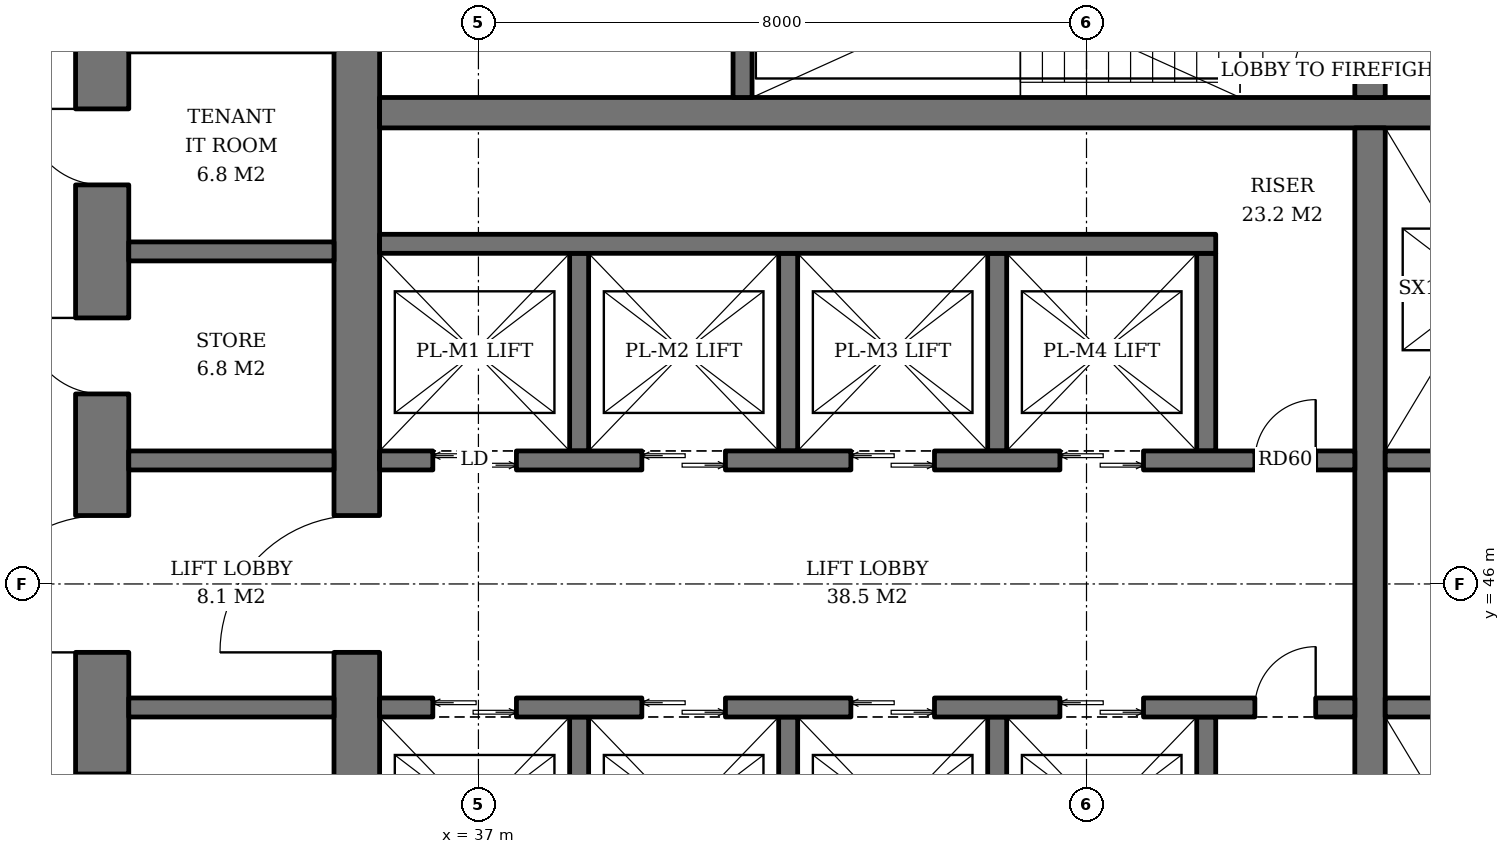
"""IFC4 building model, lengths in metres.
Left out: names, types, materials, properties, quantities, classifications, styles, units other than length and angle.
Written with IfcOpenShell. Run it as: python <this file> out.ifc"""

import sys

from ifc_helpers import new_model, si_unit, direction, frame, frame_2d, origin, place, context, subcontext, project, spatial, rectangle, extrude, element, fill, save


model = new_model("IFC4")
c1 = context("Model", 3, precision=1e-05, world=origin(), true_north=direction((0.0, 1.0)))
c2 = subcontext(c1, "Body", "Model", "MODEL_VIEW")
j1 = project(units=[si_unit("LENGTHUNIT", "METRE"), si_unit("PLANEANGLEUNIT", "RADIAN")], contexts=[c1])
p1 = place(None, origin())
s1 = spatial("IfcSite", under=j1, at=p1, CompositionType="ELEMENT")
p2 = place(p1, origin())
s2 = spatial("IfcBuilding", under=s1, at=p2, CompositionType="ELEMENT")
p3 = place(p2, frame((0.0, 0.0, 112.2)))
s3 = spatial("IfcBuildingStorey", under=s2, at=p3, CompositionType="ELEMENT", Elevation=112.2)
p4 = place(p3, frame((35.4, 36.7, 0.0), z_axis=(0.0, 0.0, 1.0), x_axis=(0.0, 1.0, 0.0)))
e1 = element("IfcWall", 1, at=p4, inside=s3, PredefinedType="SHEAR", context=c2, shape_type="SweptSolid", body=[
    extrude(rectangle(XDim=18.6, YDim=0.6, at=frame_2d((9.3, 0.0))), origin(), (0.0, 0.0, 1.0), 3.8),
])
p5 = place(p4, frame((8.4, 0.0, 0.0)))
e2 = element("IfcOpeningElement", 2, at=p5, cuts=e1, PredefinedType="OPENING", context=c2, shape_type="SweptSolid", body=[
    extrude(rectangle(XDim=1.8, YDim=2.4, at=frame_2d((0.9, 1.2))), frame((0.0, 0.31, 0.0), z_axis=(0.0, -1.0, 0.0), x_axis=(1.0, 0.0, 0.0)), (0.0, 0.0, 1.0), 0.62),
])
p6 = place(p3, frame((32.05, 33.4, 0.0), z_axis=(0.0, 0.0, 1.0), x_axis=(0.0, 1.0, 0.0)))
e3 = element("IfcWall", 3, at=p6, inside=s3, PredefinedType="SHEAR", context=c2, shape_type="SweptSolid", body=[
    extrude(rectangle(XDim=25.2, YDim=0.7, at=frame_2d((12.6, 0.0))), origin(), (0.0, 0.0, 1.0), 3.8),
])
p7 = place(p6, frame((11.7, 0.0, 0.0)))
e4 = element("IfcOpeningElement", 4, at=p7, cuts=e3, PredefinedType="OPENING", context=c2, shape_type="SweptSolid", body=[
    extrude(rectangle(XDim=1.8, YDim=2.4, at=frame_2d((0.9, 1.2))), frame((0.0, 0.36, 0.0), z_axis=(0.0, -1.0, 0.0), x_axis=(1.0, 0.0, 0.0)), (0.0, 0.0, 1.0), 0.72),
])
p8 = place(p6, frame((3.6, 0.0, 0.0)))
e5 = element("IfcOpeningElement", 5, at=p8, cuts=e3, PredefinedType="OPENING", context=c2, shape_type="SweptSolid", body=[
    extrude(rectangle(XDim=1.0, YDim=2.1, at=frame_2d((0.5, 1.05))), frame((0.0, 0.36, 0.0), z_axis=(0.0, -1.0, 0.0), x_axis=(1.0, 0.0, 0.0)), (0.0, 0.0, 1.0), 0.72),
])
p9 = place(p6, frame((6.35, 0.0, 0.0)))
e6 = element("IfcOpeningElement", 6, at=p9, cuts=e3, PredefinedType="OPENING", context=c2, shape_type="SweptSolid", body=[
    extrude(rectangle(XDim=1.0, YDim=2.1, at=frame_2d((0.5, 1.05))), frame((0.0, 0.36, 0.0), z_axis=(0.0, -1.0, 0.0), x_axis=(1.0, 0.0, 0.0)), (0.0, 0.0, 1.0), 0.72),
])
p10 = place(p6, frame((9.1, 0.0, 0.0)))
e7 = element("IfcOpeningElement", 7, at=p10, cuts=e3, PredefinedType="OPENING", context=c2, shape_type="SweptSolid", body=[
    extrude(rectangle(XDim=1.0, YDim=2.1, at=frame_2d((0.5, 1.05))), frame((0.0, 0.36, 0.0), z_axis=(0.0, -1.0, 0.0), x_axis=(1.0, 0.0, 0.0)), (0.0, 0.0, 1.0), 0.72),
])
p11 = place(p6, frame((15.1, 0.0, 0.0)))
e8 = element("IfcOpeningElement", 8, at=p11, cuts=e3, PredefinedType="OPENING", context=c2, shape_type="SweptSolid", body=[
    extrude(rectangle(XDim=1.0, YDim=2.1, at=frame_2d((0.5, 1.05))), frame((0.0, 0.36, 0.0), z_axis=(0.0, -1.0, 0.0), x_axis=(1.0, 0.0, 0.0)), (0.0, 0.0, 1.0), 0.72),
])
p12 = place(p6, frame((17.85, 0.0, 0.0)))
e9 = element("IfcOpeningElement", 9, at=p12, cuts=e3, PredefinedType="OPENING", context=c2, shape_type="SweptSolid", body=[
    extrude(rectangle(XDim=1.0, YDim=2.1, at=frame_2d((0.5, 1.05))), frame((0.0, 0.36, 0.0), z_axis=(0.0, -1.0, 0.0), x_axis=(1.0, 0.0, 0.0)), (0.0, 0.0, 1.0), 0.72),
])
p13 = place(p3, frame((35.7, 52.2, 0.0), z_axis=(0.0, 0.0, 1.0), x_axis=(1.0, 0.0, 0.0)))
e10 = element("IfcWall", 10, at=p13, inside=s3, PredefinedType="SHEAR", context=c2, shape_type="SweptSolid", body=[
    extrude(rectangle(XDim=18.6, YDim=0.4, at=frame_2d((9.3, 0.0))), origin(), (0.0, 0.0, 1.0), 3.8),
])
p14 = place(p3, frame((48.73, 40.0, 0.0), z_axis=(0.0, 0.0, 1.0), x_axis=(0.0, 1.0, 0.0)))
e11 = element("IfcWall", 11, at=p14, inside=s3, PredefinedType="SHEAR", context=c2, shape_type="SweptSolid", body=[
    extrude(rectangle(XDim=12.0, YDim=0.4, at=frame_2d((6.0, 0.0))), origin(), (0.0, 0.0, 1.0), 3.8),
])
p15 = place(p3, frame((48.73, 52.4, 0.0), z_axis=(0.0, 0.0, 1.0), x_axis=(0.0, 1.0, 0.0)))
e12 = element("IfcWall", 12, at=p15, inside=s3, PredefinedType="SHEAR", context=c2, shape_type="SweptSolid", body=[
    extrude(rectangle(XDim=2.9, YDim=0.4, at=frame_2d((1.45, 0.0))), origin(), (0.0, 0.0, 1.0), 3.8),
])
p16 = place(p15, frame((0.3, 0.0, 0.0)))
e13 = element("IfcOpeningElement", 13, at=p16, cuts=e12, PredefinedType="OPENING", context=c2, shape_type="SweptSolid", body=[
    extrude(rectangle(XDim=1.0, YDim=2.1, at=frame_2d((0.5, 1.05))), frame((0.0, 0.21, 0.0), z_axis=(0.0, -1.0, 0.0), x_axis=(1.0, 0.0, 0.0)), (0.0, 0.0, 1.0), 0.42),
])
p17 = place(p3, frame((40.475, 52.4, 0.0), z_axis=(0.0, 0.0, 1.0), x_axis=(0.0, 1.0, 0.0)))
e14 = element("IfcWall", 14, at=p17, inside=s3, PredefinedType="SHEAR", context=c2, shape_type="SweptSolid", body=[
    extrude(rectangle(XDim=2.9, YDim=0.25, at=frame_2d((1.45, 0.0))), origin(), (0.0, 0.0, 1.0), 3.8),
])
for number, where, z_axis, x_axis in (
    (15, (38.325, 47.75, 0.0), (0.0, 0.0, 1.0), (0.0, 1.0, 0.0)),
    (16, (41.075, 47.75, 0.0), (0.0, 0.0, 1.0), (0.0, 1.0, 0.0)),
    (17, (43.825, 47.75, 0.0), (0.0, 0.0, 1.0), (0.0, 1.0, 0.0)),
    (18, (46.575, 47.75, 0.0), (0.0, 0.0, 1.0), (0.0, 1.0, 0.0)),
):
    element("IfcWall", number, at=place(p3, frame(where, z_axis=z_axis, x_axis=x_axis)), inside=s3, PredefinedType="SHEAR", context=c2, shape_type="SweptSolid", body=[
        extrude(rectangle(XDim=2.6, YDim=0.25, at=frame_2d((1.3, 0.0))), origin(), (0.0, 0.0, 1.0), 3.8),
    ])
p18 = place(p3, frame((35.7, 50.475, 0.0), z_axis=(0.0, 0.0, 1.0), x_axis=(1.0, 0.0, 0.0)))
e19 = element("IfcWall", 19, at=p18, inside=s3, PredefinedType="SHEAR", context=c2, shape_type="SweptSolid", body=[
    extrude(rectangle(XDim=11.0, YDim=0.25, at=frame_2d((5.5, 0.0))), origin(), (0.0, 0.0, 1.0), 3.8),
])
p19 = place(p3, frame((35.7, 47.625, 0.0), z_axis=(0.0, 0.0, 1.0), x_axis=(1.0, 0.0, 0.0)))
e20 = element("IfcWall", 20, at=p19, inside=s3, PredefinedType="SHEAR", context=c2, shape_type="SweptSolid", body=[
    extrude(rectangle(XDim=12.83, YDim=0.25, at=frame_2d((6.415, 0.0))), origin(), (0.0, 0.0, 1.0), 3.8),
])
p20 = place(p19, frame((0.7, 0.0, 0.0)))
e21 = element("IfcOpeningElement", 21, at=p20, cuts=e20, PredefinedType="OPENING", context=c2, shape_type="SweptSolid", body=[
    extrude(rectangle(XDim=1.1, YDim=2.2, at=frame_2d((0.55, 1.1))), frame((0.0, 0.135, 0.0), z_axis=(0.0, -1.0, 0.0), x_axis=(1.0, 0.0, 0.0)), (0.0, 0.0, 1.0), 0.27),
])
p21 = place(p19, frame((3.45, 0.0, 0.0)))
e22 = element("IfcOpeningElement", 22, at=p21, cuts=e20, PredefinedType="OPENING", context=c2, shape_type="SweptSolid", body=[
    extrude(rectangle(XDim=1.1, YDim=2.2, at=frame_2d((0.55, 1.1))), frame((0.0, 0.135, 0.0), z_axis=(0.0, -1.0, 0.0), x_axis=(1.0, 0.0, 0.0)), (0.0, 0.0, 1.0), 0.27),
])
p22 = place(p19, frame((6.2, 0.0, 0.0)))
e23 = element("IfcOpeningElement", 23, at=p22, cuts=e20, PredefinedType="OPENING", context=c2, shape_type="SweptSolid", body=[
    extrude(rectangle(XDim=1.1, YDim=2.2, at=frame_2d((0.55, 1.1))), frame((0.0, 0.135, 0.0), z_axis=(0.0, -1.0, 0.0), x_axis=(1.0, 0.0, 0.0)), (0.0, 0.0, 1.0), 0.27),
])
p23 = place(p19, frame((8.95, 0.0, 0.0)))
e24 = element("IfcOpeningElement", 24, at=p23, cuts=e20, PredefinedType="OPENING", context=c2, shape_type="SweptSolid", body=[
    extrude(rectangle(XDim=1.1, YDim=2.2, at=frame_2d((0.55, 1.1))), frame((0.0, 0.135, 0.0), z_axis=(0.0, -1.0, 0.0), x_axis=(1.0, 0.0, 0.0)), (0.0, 0.0, 1.0), 0.27),
])
p24 = place(p19, frame((11.515, 0.0, 0.0)))
e25 = element("IfcOpeningElement", 25, at=p24, cuts=e20, PredefinedType="OPENING", context=c2, shape_type="SweptSolid", body=[
    extrude(rectangle(XDim=0.8, YDim=2.0, at=frame_2d((0.4, 1.0))), frame((0.0, 0.135, 0.0), z_axis=(0.0, -1.0, 0.0), x_axis=(1.0, 0.0, 0.0)), (0.0, 0.0, 1.0), 0.27),
])
for number, where, z_axis, x_axis in (
    (26, (38.325, 44.25, 0.0), (0.0, 0.0, 1.0), (0.0, -1.0, 0.0)),
    (27, (41.075, 44.25, 0.0), (0.0, 0.0, 1.0), (0.0, -1.0, 0.0)),
    (28, (43.825, 44.25, 0.0), (0.0, 0.0, 1.0), (0.0, -1.0, 0.0)),
    (29, (46.575, 44.25, 0.0), (0.0, 0.0, 1.0), (0.0, -1.0, 0.0)),
):
    element("IfcWall", number, at=place(p3, frame(where, z_axis=z_axis, x_axis=x_axis)), inside=s3, PredefinedType="SHEAR", context=c2, shape_type="SweptSolid", body=[
        extrude(rectangle(XDim=2.6, YDim=0.25, at=frame_2d((1.3, 0.0))), origin(), (0.0, 0.0, 1.0), 3.8),
    ])
p25 = place(p3, frame((35.7, 44.375, 0.0), z_axis=(0.0, 0.0, 1.0), x_axis=(1.0, 0.0, 0.0)))
e30 = element("IfcWall", 30, at=p25, inside=s3, PredefinedType="SHEAR", context=c2, shape_type="SweptSolid", body=[
    extrude(rectangle(XDim=12.83, YDim=0.25, at=frame_2d((6.415, 0.0))), origin(), (0.0, 0.0, 1.0), 3.8),
])
p26 = place(p25, frame((0.7, 0.0, 0.0)))
e31 = element("IfcOpeningElement", 31, at=p26, cuts=e30, PredefinedType="OPENING", context=c2, shape_type="SweptSolid", body=[
    extrude(rectangle(XDim=1.1, YDim=2.2, at=frame_2d((0.55, 1.1))), frame((0.0, 0.135, 0.0), z_axis=(0.0, -1.0, 0.0), x_axis=(1.0, 0.0, 0.0)), (0.0, 0.0, 1.0), 0.27),
])
p27 = place(p25, frame((3.45, 0.0, 0.0)))
e32 = element("IfcOpeningElement", 32, at=p27, cuts=e30, PredefinedType="OPENING", context=c2, shape_type="SweptSolid", body=[
    extrude(rectangle(XDim=1.1, YDim=2.2, at=frame_2d((0.55, 1.1))), frame((0.0, 0.135, 0.0), z_axis=(0.0, -1.0, 0.0), x_axis=(1.0, 0.0, 0.0)), (0.0, 0.0, 1.0), 0.27),
])
p28 = place(p25, frame((6.2, 0.0, 0.0)))
e33 = element("IfcOpeningElement", 33, at=p28, cuts=e30, PredefinedType="OPENING", context=c2, shape_type="SweptSolid", body=[
    extrude(rectangle(XDim=1.1, YDim=2.2, at=frame_2d((0.55, 1.1))), frame((0.0, 0.135, 0.0), z_axis=(0.0, -1.0, 0.0), x_axis=(1.0, 0.0, 0.0)), (0.0, 0.0, 1.0), 0.27),
])
p29 = place(p25, frame((8.95, 0.0, 0.0)))
e34 = element("IfcOpeningElement", 34, at=p29, cuts=e30, PredefinedType="OPENING", context=c2, shape_type="SweptSolid", body=[
    extrude(rectangle(XDim=1.1, YDim=2.2, at=frame_2d((0.55, 1.1))), frame((0.0, 0.135, 0.0), z_axis=(0.0, -1.0, 0.0), x_axis=(1.0, 0.0, 0.0)), (0.0, 0.0, 1.0), 0.27),
])
p30 = place(p25, frame((11.515, 0.0, 0.0)))
e35 = element("IfcOpeningElement", 35, at=p30, cuts=e30, PredefinedType="OPENING", context=c2, shape_type="SweptSolid", body=[
    extrude(rectangle(XDim=0.8, YDim=2.0, at=frame_2d((0.4, 1.0))), frame((0.0, 0.135, 0.0), z_axis=(0.0, -1.0, 0.0), x_axis=(1.0, 0.0, 0.0)), (0.0, 0.0, 1.0), 0.27),
])
for number, where, z_axis, x_axis in (
    (36, (48.93, 47.625, 0.0), (0.0, 0.0, 1.0), (1.0, 0.0, 0.0)),
    (37, (48.93, 44.375, 0.0), (0.0, 0.0, 1.0), (1.0, 0.0, 0.0)),
):
    element("IfcWall", number, at=place(p3, frame(where, z_axis=z_axis, x_axis=x_axis)), inside=s3, PredefinedType="SHEAR", context=c2, shape_type="SweptSolid", body=[
        extrude(rectangle(XDim=5.37, YDim=0.25, at=frame_2d((2.685, 0.0))), origin(), (0.0, 0.0, 1.0), 3.8),
    ])
for number, where, z_axis, x_axis in (
    (38, (32.4, 44.375, 0.0), (0.0, 0.0, 1.0), (1.0, 0.0, 0.0)),
    (39, (32.4, 47.625, 0.0), (0.0, 0.0, 1.0), (1.0, 0.0, 0.0)),
    (40, (32.4, 50.375, 0.0), (0.0, 0.0, 1.0), (1.0, 0.0, 0.0)),
):
    element("IfcWall", number, at=place(p3, frame(where, z_axis=z_axis, x_axis=x_axis)), inside=s3, PredefinedType="SHEAR", context=c2, shape_type="SweptSolid", body=[
        extrude(rectangle(XDim=2.7, YDim=0.25, at=frame_2d((1.35, 0.0))), origin(), (0.0, 0.0, 1.0), 3.8),
    ])
p31 = place(p20, origin())
e41 = element("IfcDoor", 41, at=p31, inside=s3, OperationType="DOUBLE_DOOR_SLIDING", PredefinedType="DOOR", context=c2, shape_type="SweptSolid", body=[
    extrude(rectangle(XDim=1.1, YDim=2.2, at=frame_2d((0.55, 1.1))), frame((0.0, 0.025, 0.0), z_axis=(0.0, -1.0, 0.0), x_axis=(1.0, 0.0, 0.0)), (0.0, 0.0, 1.0), 0.05),
])
fill(e21, e41)
p32 = place(p21, origin())
e42 = element("IfcDoor", 42, at=p32, inside=s3, OperationType="DOUBLE_DOOR_SLIDING", PredefinedType="DOOR", context=c2, shape_type="SweptSolid", body=[
    extrude(rectangle(XDim=1.1, YDim=2.2, at=frame_2d((0.55, 1.1))), frame((0.0, 0.025, 0.0), z_axis=(0.0, -1.0, 0.0), x_axis=(1.0, 0.0, 0.0)), (0.0, 0.0, 1.0), 0.05),
])
fill(e22, e42)
p33 = place(p22, origin())
e43 = element("IfcDoor", 43, at=p33, inside=s3, OperationType="DOUBLE_DOOR_SLIDING", PredefinedType="DOOR", context=c2, shape_type="SweptSolid", body=[
    extrude(rectangle(XDim=1.1, YDim=2.2, at=frame_2d((0.55, 1.1))), frame((0.0, 0.025, 0.0), z_axis=(0.0, -1.0, 0.0), x_axis=(1.0, 0.0, 0.0)), (0.0, 0.0, 1.0), 0.05),
])
fill(e23, e43)
p34 = place(p23, origin())
e44 = element("IfcDoor", 44, at=p34, inside=s3, OperationType="DOUBLE_DOOR_SLIDING", PredefinedType="DOOR", context=c2, shape_type="SweptSolid", body=[
    extrude(rectangle(XDim=1.1, YDim=2.2, at=frame_2d((0.55, 1.1))), frame((0.0, 0.025, 0.0), z_axis=(0.0, -1.0, 0.0), x_axis=(1.0, 0.0, 0.0)), (0.0, 0.0, 1.0), 0.05),
])
fill(e24, e44)
p35 = place(p24, origin())
e45 = element("IfcDoor", 45, at=p35, inside=s3, OperationType="SINGLE_SWING_RIGHT", PredefinedType="DOOR", context=c2, shape_type="SweptSolid", body=[
    extrude(rectangle(XDim=0.8, YDim=2.0, at=frame_2d((0.4, 1.0))), frame((0.0, 0.025, 0.0), z_axis=(0.0, -1.0, 0.0), x_axis=(1.0, 0.0, 0.0)), (0.0, 0.0, 1.0), 0.05),
])
fill(e25, e45)
p36 = place(p26, origin())
e46 = element("IfcDoor", 46, at=p36, inside=s3, OperationType="DOUBLE_DOOR_SLIDING", PredefinedType="DOOR", context=c2, shape_type="SweptSolid", body=[
    extrude(rectangle(XDim=1.1, YDim=2.2, at=frame_2d((0.55, 1.1))), frame((0.0, 0.025, 0.0), z_axis=(0.0, -1.0, 0.0), x_axis=(1.0, 0.0, 0.0)), (0.0, 0.0, 1.0), 0.05),
])
fill(e31, e46)
p37 = place(p27, origin())
e47 = element("IfcDoor", 47, at=p37, inside=s3, OperationType="DOUBLE_DOOR_SLIDING", PredefinedType="DOOR", context=c2, shape_type="SweptSolid", body=[
    extrude(rectangle(XDim=1.1, YDim=2.2, at=frame_2d((0.55, 1.1))), frame((0.0, 0.025, 0.0), z_axis=(0.0, -1.0, 0.0), x_axis=(1.0, 0.0, 0.0)), (0.0, 0.0, 1.0), 0.05),
])
fill(e32, e47)
p38 = place(p28, origin())
e48 = element("IfcDoor", 48, at=p38, inside=s3, OperationType="DOUBLE_DOOR_SLIDING", PredefinedType="DOOR", context=c2, shape_type="SweptSolid", body=[
    extrude(rectangle(XDim=1.1, YDim=2.2, at=frame_2d((0.55, 1.1))), frame((0.0, 0.025, 0.0), z_axis=(0.0, -1.0, 0.0), x_axis=(1.0, 0.0, 0.0)), (0.0, 0.0, 1.0), 0.05),
])
fill(e33, e48)
p39 = place(p29, origin())
e49 = element("IfcDoor", 49, at=p39, inside=s3, OperationType="DOUBLE_DOOR_SLIDING", PredefinedType="DOOR", context=c2, shape_type="SweptSolid", body=[
    extrude(rectangle(XDim=1.1, YDim=2.2, at=frame_2d((0.55, 1.1))), frame((0.0, 0.025, 0.0), z_axis=(0.0, -1.0, 0.0), x_axis=(1.0, 0.0, 0.0)), (0.0, 0.0, 1.0), 0.05),
])
fill(e34, e49)
p40 = place(p30, origin())
e50 = element("IfcDoor", 50, at=p40, inside=s3, OperationType="SINGLE_SWING_RIGHT", PredefinedType="DOOR", context=c2, shape_type="SweptSolid", body=[
    extrude(rectangle(XDim=0.8, YDim=2.0, at=frame_2d((0.4, 1.0))), frame((0.0, 0.025, 0.0), z_axis=(0.0, -1.0, 0.0), x_axis=(1.0, 0.0, 0.0)), (0.0, 0.0, 1.0), 0.05),
])
fill(e35, e50)
p41 = place(p16, origin())
e51 = element("IfcDoor", 51, at=p41, inside=s3, OperationType="SINGLE_SWING_LEFT", PredefinedType="DOOR", context=c2, shape_type="SweptSolid", body=[
    extrude(rectangle(XDim=1.0, YDim=2.1, at=frame_2d((0.5, 1.05))), frame((0.0, 0.025, 0.0), z_axis=(0.0, -1.0, 0.0), x_axis=(1.0, 0.0, 0.0)), (0.0, 0.0, 1.0), 0.05),
])
fill(e13, e51)
p42 = place(p5, origin())
e52 = element("IfcDoor", 52, at=p42, inside=s3, OperationType="DOUBLE_DOOR_SINGLE_SWING", PredefinedType="DOOR", context=c2, shape_type="SweptSolid", body=[
    extrude(rectangle(XDim=1.8, YDim=2.4, at=frame_2d((0.9, 1.2))), frame((0.0, 0.025, 0.0), z_axis=(0.0, -1.0, 0.0), x_axis=(1.0, 0.0, 0.0)), (0.0, 0.0, 1.0), 0.05),
])
fill(e2, e52)
p43 = place(p7, origin())
e53 = element("IfcDoor", 53, at=p43, inside=s3, OperationType="DOUBLE_DOOR_SINGLE_SWING", PredefinedType="DOOR", context=c2, shape_type="SweptSolid", body=[
    extrude(rectangle(XDim=1.8, YDim=2.4, at=frame_2d((0.9, 1.2))), frame((0.0, 0.025, 0.0), z_axis=(0.0, -1.0, 0.0), x_axis=(1.0, 0.0, 0.0)), (0.0, 0.0, 1.0), 0.05),
])
fill(e4, e53)
p44 = place(p11, origin())
e54 = element("IfcDoor", 54, at=p44, inside=s3, OperationType="SINGLE_SWING_RIGHT", PredefinedType="DOOR", context=c2, shape_type="SweptSolid", body=[
    extrude(rectangle(XDim=1.0, YDim=2.1, at=frame_2d((0.5, 1.05))), frame((0.0, -0.29, 0.0), z_axis=(0.0, -1.0, 0.0), x_axis=(1.0, 0.0, 0.0)), (0.0, 0.0, 1.0), 0.05),
])
fill(e8, e54)
p45 = place(p12, origin())
e55 = element("IfcDoor", 55, at=p45, inside=s3, OperationType="SINGLE_SWING_RIGHT", PredefinedType="DOOR", context=c2, shape_type="SweptSolid", body=[
    extrude(rectangle(XDim=1.0, YDim=2.1, at=frame_2d((0.5, 1.05))), frame((0.0, -0.29, 0.0), z_axis=(0.0, -1.0, 0.0), x_axis=(1.0, 0.0, 0.0)), (0.0, 0.0, 1.0), 0.05),
])
fill(e9, e55)
save(model, sys.argv[1])
